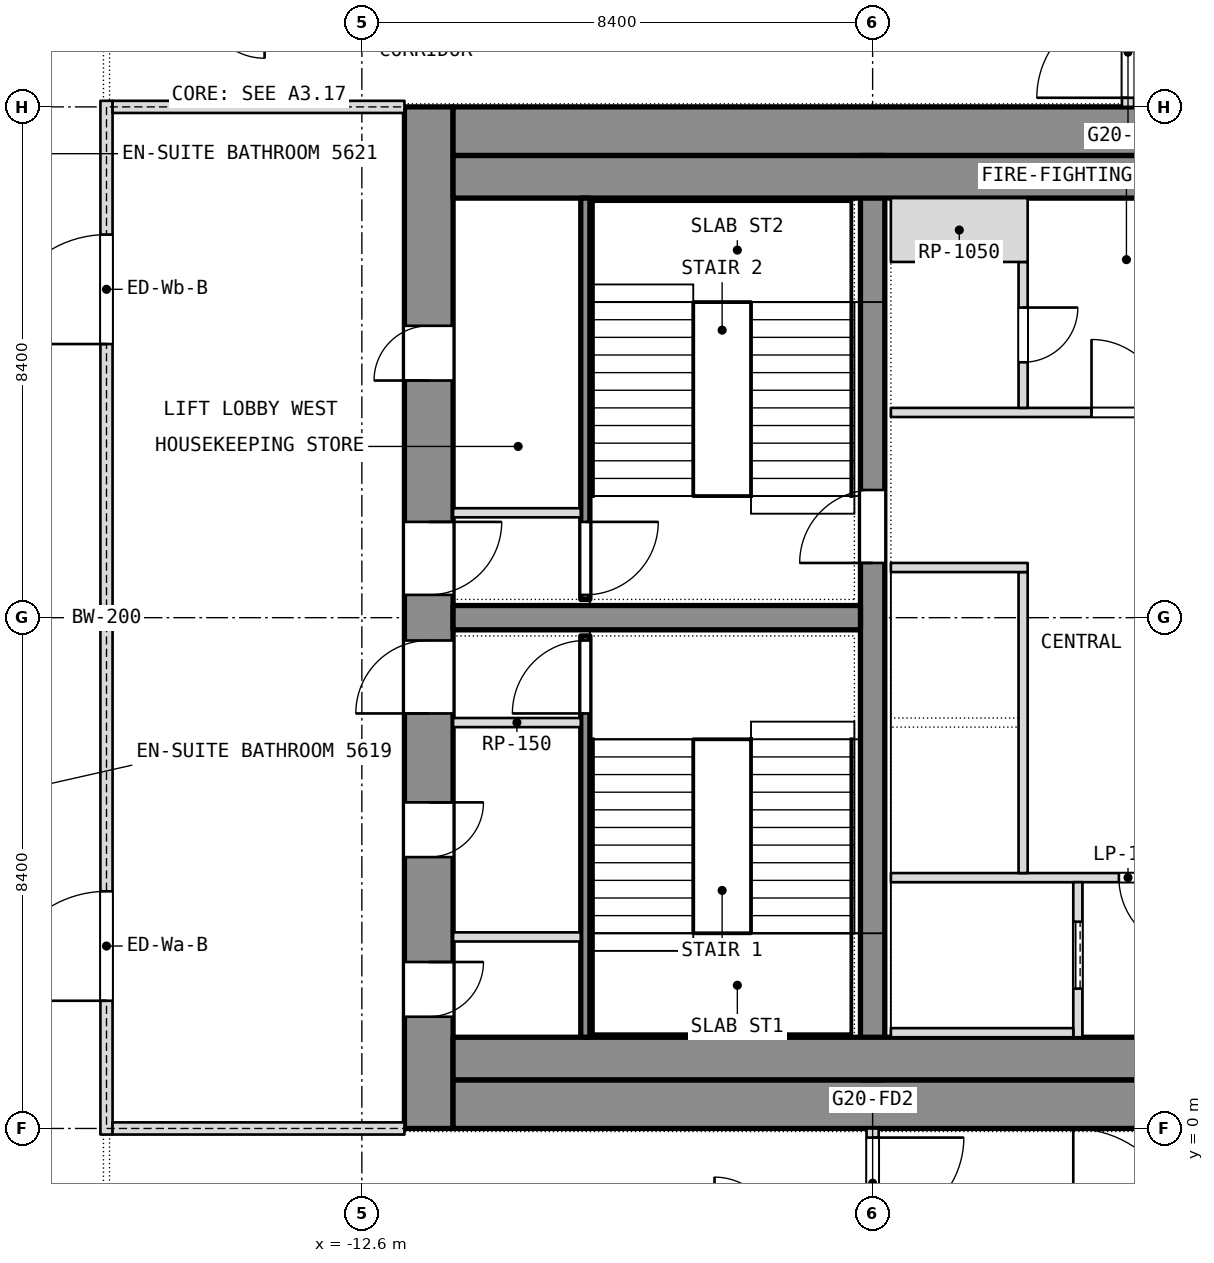
"""IFC4 building model, lengths in metres.
Left out: names, types, materials, properties, quantities, classifications, styles, units other than length and angle.
Written with IfcOpenShell. Run it as: python <this file> out.ifc"""

import sys

from ifc_helpers import new_model, si_unit, direction, frame, frame_2d, origin, place, context, subcontext, project, spatial, rectangle, extrude, element, fill, save


model = new_model("IFC4")
c1 = context("Model", 3, precision=1e-05, world=origin(), true_north=direction((0.0, 1.0)))
c2 = subcontext(c1, "Body", "Model", "MODEL_VIEW")
j1 = project(units=[si_unit("LENGTHUNIT", "METRE"), si_unit("PLANEANGLEUNIT", "RADIAN")], contexts=[c1])
p1 = place(None, origin())
s1 = spatial("IfcSite", under=j1, at=p1, CompositionType="ELEMENT")
p2 = place(p1, origin())
s2 = spatial("IfcBuilding", under=s1, at=p2, CompositionType="ELEMENT")
p3 = place(p2, frame((0.0, 0.0, 238.1)))
s3 = spatial("IfcBuildingStorey", under=s2, at=p3, CompositionType="ELEMENT", Elevation=238.1)
p4 = place(p3, frame((-11.5, 0.0, 0.0), z_axis=(0.0, 0.0, 1.0), x_axis=(0.0, 1.0, 0.0)))
e1 = element("IfcWall", 1, at=p4, inside=s3, PredefinedType="SHEAR", context=c2, shape_type="SweptSolid", body=[
    extrude(rectangle(XDim=16.8, YDim=0.8, at=frame_2d((8.4, 0.0))), origin(), (0.0, 0.0, 1.0), 3.6),
])
p5 = place(p4, frame((1.837, 0.0, 0.0)))
e2 = element("IfcOpeningElement", 2, at=p5, cuts=e1, PredefinedType="OPENING", context=c2, shape_type="SweptSolid", body=[
    extrude(rectangle(XDim=0.9, YDim=2.1, at=frame_2d((0.45, 1.05))), frame((0.0, 0.4, 0.0), z_axis=(0.0, -1.0, 0.0), x_axis=(1.0, 0.0, 0.0)), (0.0, 0.0, 1.0), 0.8),
])
p6 = place(p4, frame((4.462, 0.0, 0.0)))
e3 = element("IfcOpeningElement", 3, at=p6, cuts=e1, PredefinedType="OPENING", context=c2, shape_type="SweptSolid", body=[
    extrude(rectangle(XDim=0.9, YDim=2.1, at=frame_2d((0.45, 1.05))), frame((0.0, 0.4, 0.0), z_axis=(0.0, -1.0, 0.0), x_axis=(1.0, 0.0, 0.0)), (0.0, 0.0, 1.0), 0.8),
])
p7 = place(p4, frame((6.825, 0.0, 0.0)))
e4 = element("IfcOpeningElement", 4, at=p7, cuts=e1, PredefinedType="OPENING", context=c2, shape_type="SweptSolid", body=[
    extrude(rectangle(XDim=1.2, YDim=2.1, at=frame_2d((0.6, 1.05))), frame((0.0, 0.4, 0.0), z_axis=(0.0, -1.0, 0.0), x_axis=(1.0, 0.0, 0.0)), (0.0, 0.0, 1.0), 0.8),
])
p8 = place(p4, frame((12.3, 0.0, 0.0)))
e5 = element("IfcOpeningElement", 5, at=p8, cuts=e1, PredefinedType="OPENING", context=c2, shape_type="SweptSolid", body=[
    extrude(rectangle(XDim=0.9, YDim=2.1, at=frame_2d((0.45, 1.05))), frame((0.0, 0.4, 0.0), z_axis=(0.0, -1.0, 0.0), x_axis=(1.0, 0.0, 0.0)), (0.0, 0.0, 1.0), 0.8),
])
p9 = place(p4, frame((8.775, 0.0, 0.0)))
e6 = element("IfcOpeningElement", 6, at=p9, cuts=e1, PredefinedType="OPENING", context=c2, shape_type="SweptSolid", body=[
    extrude(rectangle(XDim=1.2, YDim=2.1, at=frame_2d((0.6, 1.05))), frame((0.0, 0.4, 0.0), z_axis=(0.0, -1.0, 0.0), x_axis=(1.0, 0.0, 0.0)), (0.0, 0.0, 1.0), 0.8),
])
for number, where, z_axis, x_axis in (
    (7, (-11.1, 0.4, 0.0), (0.0, 0.0, 1.0), (1.0, 0.0, 0.0)),
    (8, (-11.1, 16.4, 0.0), (0.0, 0.0, 1.0), (1.0, 0.0, 0.0)),
):
    element("IfcWall", number, at=place(p3, frame(where, z_axis=z_axis, x_axis=x_axis)), inside=s3, PredefinedType="SHEAR", context=c2, shape_type="SweptSolid", body=[
        extrude(rectangle(XDim=22.2, YDim=0.8, at=frame_2d((11.1, 0.0))), origin(), (0.0, 0.0, 1.0), 3.6),
    ])
p10 = place(p3, frame((-4.2, 0.8, 0.0), z_axis=(0.0, 0.0, 1.0), x_axis=(0.0, 1.0, 0.0)))
e9 = element("IfcWall", 9, at=p10, inside=s3, PredefinedType="SHEAR", context=c2, shape_type="SweptSolid", body=[
    extrude(rectangle(XDim=15.2, YDim=0.4, at=frame_2d((7.6, 0.0))), origin(), (0.0, 0.0, 1.0), 3.6),
])
p11 = place(p10, frame((8.5, 0.0, 0.0)))
e10 = element("IfcOpeningElement", 10, at=p11, cuts=e9, PredefinedType="OPENING", context=c2, shape_type="SweptSolid", body=[
    extrude(rectangle(XDim=1.2, YDim=2.1, at=frame_2d((0.6, 1.05))), frame((0.0, 0.2, 0.0), z_axis=(0.0, -1.0, 0.0), x_axis=(1.0, 0.0, 0.0)), (0.0, 0.0, 1.0), 0.4),
])
p12 = place(p3, frame((-11.1, 8.4, 0.0), z_axis=(0.0, 0.0, 1.0), x_axis=(1.0, 0.0, 0.0)))
e11 = element("IfcWall", 11, at=p12, inside=s3, PredefinedType="SHEAR", context=c2, shape_type="SweptSolid", body=[
    extrude(rectangle(XDim=6.7, YDim=0.4, at=frame_2d((3.35, 0.0))), origin(), (0.0, 0.0, 1.0), 3.6),
])
p13 = place(p3, frame((0.0, 16.8, 0.0), z_axis=(0.0, 0.0, 1.0), x_axis=(0.0, 1.0, 0.0)))
e12 = element("IfcWall", 12, at=p13, inside=s3, PredefinedType="PARTITIONING", context=c2, shape_type="SweptSolid", body=[
    extrude(rectangle(XDim=5.54, YDim=0.2, at=frame_2d((2.77, 0.0))), origin(), (0.0, 0.0, 1.0), 3.34),
])
p14 = place(p13, frame((0.15, 0.0, 0.0)))
e13 = element("IfcOpeningElement", 13, at=p14, cuts=e12, PredefinedType="OPENING", context=c2, shape_type="SweptSolid", body=[
    extrude(rectangle(XDim=1.5, YDim=2.1, at=frame_2d((0.75, 1.05))), frame((0.0, 0.1, 0.0), z_axis=(0.0, -1.0, 0.0), x_axis=(1.0, 0.0, 0.0)), (0.0, 0.0, 1.0), 0.2),
])
p15 = place(p3, frame((-4.2, -13.6, 0.0), z_axis=(0.0, 0.0, 1.0), x_axis=(0.0, 1.0, 0.0)))
e14 = element("IfcWall", 14, at=p15, inside=s3, PredefinedType="PARTITIONING", context=c2, shape_type="SweptSolid", body=[
    extrude(rectangle(XDim=13.6, YDim=0.2, at=frame_2d((6.8, 0.0))), origin(), (0.0, 0.0, 1.0), 3.34),
])
p16 = place(p15, frame((11.95, 0.0, 0.0)))
e15 = element("IfcOpeningElement", 15, at=p16, cuts=e14, PredefinedType="OPENING", context=c2, shape_type="SweptSolid", body=[
    extrude(rectangle(XDim=1.5, YDim=2.1, at=frame_2d((0.75, 1.05))), frame((0.0, 0.1, 0.0), z_axis=(0.0, -1.0, 0.0), x_axis=(1.0, 0.0, 0.0)), (0.0, 0.0, 1.0), 0.2),
])
p17 = place(p15, frame((0.25, 0.0, 0.0)))
e16 = element("IfcOpeningElement", 16, at=p17, cuts=e14, PredefinedType="OPENING", context=c2, shape_type="SweptSolid", body=[
    extrude(rectangle(XDim=1.5, YDim=2.1, at=frame_2d((0.75, 1.05))), frame((0.0, 0.1, 0.0), z_axis=(0.0, -1.0, 0.0), x_axis=(1.0, 0.0, 0.0)), (0.0, 0.0, 1.0), 0.2),
])
for number, where, z_axis, x_axis in (
    (17, (-11.1, 1.15, 0.0), (0.0, 0.0, 1.0), (1.0, 0.0, 0.0)),
    (18, (-11.1, 15.65, 0.0), (0.0, 0.0, 1.0), (1.0, 0.0, 0.0)),
):
    element("IfcWall", number, at=place(p3, frame(where, z_axis=z_axis, x_axis=x_axis)), inside=s3, PredefinedType="PARTITIONING", context=c2, shape_type="SweptSolid", body=[
        extrude(rectangle(XDim=22.2, YDim=0.7, at=frame_2d((11.1, 0.0))), origin(), (0.0, 0.0, 1.0), 3.34),
    ])
p18 = place(p3, frame((-8.925, 1.5, 0.0), z_axis=(0.0, 0.0, 1.0), x_axis=(0.0, 1.0, 0.0)))
e19 = element("IfcWall", 19, at=p18, inside=s3, PredefinedType="SHEAR", context=c2, shape_type="SweptSolid", body=[
    extrude(rectangle(XDim=6.6, YDim=0.15, at=frame_2d((3.3, 0.0))), origin(), (0.0, 0.0, 1.0), 3.34),
])
p19 = place(p18, frame((5.325, 0.0, 0.0)))
e20 = element("IfcOpeningElement", 20, at=p19, cuts=e19, PredefinedType="OPENING", context=c2, shape_type="SweptSolid", body=[
    extrude(rectangle(XDim=1.2, YDim=2.1, at=frame_2d((0.6, 1.05))), frame((0.0, 0.075, 0.0), z_axis=(0.0, -1.0, 0.0), x_axis=(1.0, 0.0, 0.0)), (0.0, 0.0, 1.0), 0.15),
])
for number, where, z_axis, x_axis in (
    (21, (-11.1, 6.675, 0.0), (0.0, 0.0, 1.0), (1.0, 0.0, 0.0)),
    (22, (-11.1, 3.15, 0.0), (0.0, 0.0, 1.0), (1.0, 0.0, 0.0)),
):
    element("IfcWall", number, at=place(p3, frame(where, z_axis=z_axis, x_axis=x_axis)), inside=s3, PredefinedType="PARTITIONING", context=c2, shape_type="SweptSolid", body=[
        extrude(rectangle(XDim=2.1, YDim=0.15, at=frame_2d((1.05, 0.0))), origin(), (0.0, 0.0, 1.0), 3.34),
    ])
p20 = place(p3, frame((-8.925, 8.7, 0.0), z_axis=(0.0, 0.0, 1.0), x_axis=(0.0, 1.0, 0.0)))
e23 = element("IfcWall", 23, at=p20, inside=s3, PredefinedType="SHEAR", context=c2, shape_type="SweptSolid", body=[
    extrude(rectangle(XDim=6.6, YDim=0.15, at=frame_2d((3.3, 0.0))), origin(), (0.0, 0.0, 1.0), 3.34),
])
p21 = place(p20, frame((0.075, 0.0, 0.0)))
e24 = element("IfcOpeningElement", 24, at=p21, cuts=e23, PredefinedType="OPENING", context=c2, shape_type="SweptSolid", body=[
    extrude(rectangle(XDim=1.2, YDim=2.1, at=frame_2d((0.6, 1.05))), frame((0.0, 0.075, 0.0), z_axis=(0.0, -1.0, 0.0), x_axis=(1.0, 0.0, 0.0)), (0.0, 0.0, 1.0), 0.15),
])
p22 = place(p3, frame((-11.1, 10.125, 0.0), z_axis=(0.0, 0.0, 1.0), x_axis=(1.0, 0.0, 0.0)))
e25 = element("IfcWall", 25, at=p22, inside=s3, PredefinedType="PARTITIONING", context=c2, shape_type="SweptSolid", body=[
    extrude(rectangle(XDim=2.1, YDim=0.15, at=frame_2d((1.05, 0.0))), origin(), (0.0, 0.0, 1.0), 3.34),
])
p23 = place(p3, frame((-3.9, 4.125, 0.0), z_axis=(0.0, 0.0, 1.0), x_axis=(1.0, 0.0, 0.0)))
e26 = element("IfcWall", 26, at=p23, inside=s3, PredefinedType="PARTITIONING", context=c2, shape_type="SweptSolid", body=[
    extrude(rectangle(XDim=7.8, YDim=0.15, at=frame_2d((3.9, 0.0))), origin(), (0.0, 0.0, 1.0), 3.34),
])
p24 = place(p23, frame((3.75, 0.0, 0.0)))
e27 = element("IfcOpeningElement", 27, at=p24, cuts=e26, PredefinedType="OPENING", context=c2, shape_type="SweptSolid", body=[
    extrude(rectangle(XDim=1.2, YDim=2.1, at=frame_2d((0.6, 1.05))), frame((0.0, 0.075, 0.0), z_axis=(0.0, -1.0, 0.0), x_axis=(1.0, 0.0, 0.0)), (0.0, 0.0, 1.0), 0.15),
])
p25 = place(p3, frame((-3.9, 11.775, 0.0), z_axis=(0.0, 0.0, 1.0), x_axis=(1.0, 0.0, 0.0)))
e28 = element("IfcWall", 28, at=p25, inside=s3, PredefinedType="PARTITIONING", context=c2, shape_type="SweptSolid", body=[
    extrude(rectangle(XDim=7.8, YDim=0.15, at=frame_2d((3.9, 0.0))), origin(), (0.0, 0.0, 1.0), 3.34),
])
p26 = place(p25, frame((3.3, 0.0, 0.0)))
e29 = element("IfcOpeningElement", 29, at=p26, cuts=e28, PredefinedType="OPENING", context=c2, shape_type="SweptSolid", body=[
    extrude(rectangle(XDim=1.2, YDim=2.1, at=frame_2d((0.6, 1.05))), frame((0.0, 0.075, 0.0), z_axis=(0.0, -1.0, 0.0), x_axis=(1.0, 0.0, 0.0)), (0.0, 0.0, 1.0), 0.15),
])
p27 = place(p3, frame((-0.825, 1.5, 0.0), z_axis=(0.0, 0.0, 1.0), x_axis=(0.0, 1.0, 0.0)))
e30 = element("IfcWall", 30, at=p27, inside=s3, PredefinedType="SHEAR", context=c2, shape_type="SweptSolid", body=[
    extrude(rectangle(XDim=2.55, YDim=0.15, at=frame_2d((1.275, 0.0))), origin(), (0.0, 0.0, 1.0), 3.6),
])
p28 = place(p27, frame((0.8, 0.0, 0.0)))
e31 = element("IfcOpeningElement", 31, at=p28, cuts=e30, PredefinedType="OPENING", context=c2, shape_type="SweptSolid", body=[
    extrude(rectangle(XDim=1.1, YDim=2.1, at=frame_2d((0.55, 1.05))), frame((0.0, 0.075, 0.0), z_axis=(0.0, -1.0, 0.0), x_axis=(1.0, 0.0, 0.0)), (0.0, 0.0, 1.0), 0.15),
])
p29 = place(p3, frame((-3.9, 1.575, 0.0), z_axis=(0.0, 0.0, 1.0), x_axis=(1.0, 0.0, 0.0)))
e32 = element("IfcWall", 32, at=p29, inside=s3, PredefinedType="SHEAR", context=c2, shape_type="SweptSolid", body=[
    extrude(rectangle(XDim=3.0, YDim=0.15, at=frame_2d((1.5, 0.0))), origin(), (0.0, 0.0, 1.0), 3.6),
])
p30 = place(p3, frame((-1.725, 4.2, 0.0), z_axis=(0.0, 0.0, 1.0), x_axis=(0.0, 1.0, 0.0)))
e33 = element("IfcWall", 33, at=p30, inside=s3, PredefinedType="SHEAR", context=c2, shape_type="SweptSolid", body=[
    extrude(rectangle(XDim=4.95, YDim=0.15, at=frame_2d((2.475, 0.0))), origin(), (0.0, 0.0, 1.0), 3.6),
])
p31 = place(p3, frame((-3.9, 9.225, 0.0), z_axis=(0.0, 0.0, 1.0), x_axis=(1.0, 0.0, 0.0)))
e34 = element("IfcWall", 34, at=p31, inside=s3, PredefinedType="SHEAR", context=c2, shape_type="SweptSolid", body=[
    extrude(rectangle(XDim=2.25, YDim=0.15, at=frame_2d((1.125, 0.0))), origin(), (0.0, 0.0, 1.0), 3.6),
])
p32 = place(p3, frame((-1.725, 11.85, 0.0), z_axis=(0.0, 0.0, 1.0), x_axis=(0.0, 1.0, 0.0)))
e35 = element("IfcWall", 35, at=p32, inside=s3, PredefinedType="PARTITIONING", context=c2, shape_type="SweptSolid", body=[
    extrude(rectangle(XDim=2.4, YDim=0.15, at=frame_2d((1.2, 0.0))), origin(), (0.0, 0.0, 1.0), 3.34),
])
p33 = place(p32, frame((0.75, 0.0, 0.0)))
e36 = element("IfcOpeningElement", 36, at=p33, cuts=e35, PredefinedType="OPENING", context=c2, shape_type="SweptSolid", body=[
    extrude(rectangle(XDim=0.9, YDim=2.1, at=frame_2d((0.45, 1.05))), frame((0.0, 0.075, 0.0), z_axis=(0.0, -1.0, 0.0), x_axis=(1.0, 0.0, 0.0)), (0.0, 0.0, 1.0), 0.15),
])
p34 = place(p3, frame((-3.9, 14.775, 0.0), z_axis=(0.0, 0.0, 1.0), x_axis=(1.0, 0.0, 0.0)))
e37 = element("IfcWall", 37, at=p34, inside=s3, PredefinedType="PARTITIONING", context=c2, shape_type="SweptSolid", body=[
    extrude(rectangle(XDim=2.25, YDim=1.05, at=frame_2d((1.125, 0.0))), origin(), (0.0, 0.0, 1.0), 3.34),
])
p35 = place(p3, frame((-16.8, -0.1, 0.0), z_axis=(0.0, 0.0, 1.0), x_axis=(0.0, 1.0, 0.0)))
e38 = element("IfcWall", 38, at=p35, inside=s3, PredefinedType="PARTITIONING", context=c2, shape_type="SweptSolid", body=[
    extrude(rectangle(XDim=17.0, YDim=0.2, at=frame_2d((8.5, 0.0))), origin(), (0.0, 0.0, 1.0), 3.34),
])
p36 = place(p35, frame((2.2, 0.0, 0.0)))
e39 = element("IfcOpeningElement", 39, at=p36, cuts=e38, PredefinedType="OPENING", context=c2, shape_type="SweptSolid", body=[
    extrude(rectangle(XDim=1.8, YDim=2.1, at=frame_2d((0.9, 1.05))), frame((0.0, 0.1, 0.0), z_axis=(0.0, -1.0, 0.0), x_axis=(1.0, 0.0, 0.0)), (0.0, 0.0, 1.0), 0.2),
])
p37 = place(p35, frame((13.0, 0.0, 0.0)))
e40 = element("IfcOpeningElement", 40, at=p37, cuts=e38, PredefinedType="OPENING", context=c2, shape_type="SweptSolid", body=[
    extrude(rectangle(XDim=1.8, YDim=2.1, at=frame_2d((0.9, 1.05))), frame((0.0, 0.1, 0.0), z_axis=(0.0, -1.0, 0.0), x_axis=(1.0, 0.0, 0.0)), (0.0, 0.0, 1.0), 0.2),
])
for number, where, z_axis, x_axis in (
    (41, (-16.7, 0.0, 0.0), (0.0, 0.0, 1.0), (1.0, 0.0, 0.0)),
    (42, (-16.7, 16.8, 0.0), (0.0, 0.0, 1.0), (1.0, 0.0, 0.0)),
):
    element("IfcWall", number, at=place(p3, frame(where, z_axis=z_axis, x_axis=x_axis)), inside=s3, PredefinedType="PARTITIONING", context=c2, shape_type="SweptSolid", body=[
        extrude(rectangle(XDim=4.8, YDim=0.2, at=frame_2d((2.4, 0.0))), origin(), (0.0, 0.0, 1.0), 2.94),
    ])
p38 = place(p5, origin())
e43 = element("IfcDoor", 43, at=p38, inside=s3, OperationType="SINGLE_SWING_LEFT", PredefinedType="DOOR", context=c2, shape_type="SweptSolid", body=[
    extrude(rectangle(XDim=0.9, YDim=2.1, at=frame_2d((0.45, 1.05))), frame((0.0, 0.025, 0.0), z_axis=(0.0, -1.0, 0.0), x_axis=(1.0, 0.0, 0.0)), (0.0, 0.0, 1.0), 0.05),
])
fill(e2, e43)
p39 = place(p6, origin())
e44 = element("IfcDoor", 44, at=p39, inside=s3, OperationType="SINGLE_SWING_LEFT", PredefinedType="DOOR", context=c2, shape_type="SweptSolid", body=[
    extrude(rectangle(XDim=0.9, YDim=2.1, at=frame_2d((0.45, 1.05))), frame((0.0, 0.025, 0.0), z_axis=(0.0, -1.0, 0.0), x_axis=(1.0, 0.0, 0.0)), (0.0, 0.0, 1.0), 0.05),
])
fill(e3, e44)
p40 = place(p7, origin())
e45 = element("IfcDoor", 45, at=p40, inside=s3, OperationType="SINGLE_SWING_LEFT", PredefinedType="DOOR", context=c2, shape_type="SweptSolid", body=[
    extrude(rectangle(XDim=1.2, YDim=2.1, at=frame_2d((0.6, 1.05))), frame((0.0, 0.025, 0.0), z_axis=(0.0, -1.0, 0.0), x_axis=(1.0, 0.0, 0.0)), (0.0, 0.0, 1.0), 0.05),
])
fill(e4, e45)
p41 = place(p19, origin())
e46 = element("IfcDoor", 46, at=p41, inside=s3, OperationType="SINGLE_SWING_LEFT", PredefinedType="DOOR", context=c2, shape_type="SweptSolid", body=[
    extrude(rectangle(XDim=1.2, YDim=2.1, at=frame_2d((0.6, 1.05))), frame((0.0, 0.025, 0.0), z_axis=(0.0, -1.0, 0.0), x_axis=(1.0, 0.0, 0.0)), (0.0, 0.0, 1.0), 0.05),
])
fill(e20, e46)
p42 = place(p8, origin())
e47 = element("IfcDoor", 47, at=p42, inside=s3, OperationType="SINGLE_SWING_LEFT", PredefinedType="DOOR", context=c2, shape_type="SweptSolid", body=[
    extrude(rectangle(XDim=0.9, YDim=2.1, at=frame_2d((0.45, 1.05))), frame((0.0, 0.025, 0.0), z_axis=(0.0, -1.0, 0.0), x_axis=(1.0, 0.0, 0.0)), (0.0, 0.0, 1.0), 0.05),
])
fill(e5, e47)
p43 = place(p9, origin())
e48 = element("IfcDoor", 48, at=p43, inside=s3, OperationType="SINGLE_SWING_LEFT", PredefinedType="DOOR", context=c2, shape_type="SweptSolid", body=[
    extrude(rectangle(XDim=1.2, YDim=2.1, at=frame_2d((0.6, 1.05))), frame((0.0, 0.025, 0.0), z_axis=(0.0, -1.0, 0.0), x_axis=(1.0, 0.0, 0.0)), (0.0, 0.0, 1.0), 0.05),
])
fill(e6, e48)
p44 = place(p21, origin())
e49 = element("IfcDoor", 49, at=p44, inside=s3, OperationType="SINGLE_SWING_LEFT", PredefinedType="DOOR", context=c2, shape_type="SweptSolid", body=[
    extrude(rectangle(XDim=1.2, YDim=2.1, at=frame_2d((0.6, 1.05))), frame((0.0, 0.025, 0.0), z_axis=(0.0, -1.0, 0.0), x_axis=(1.0, 0.0, 0.0)), (0.0, 0.0, 1.0), 0.05),
])
fill(e24, e49)
p45 = place(p28, origin())
e50 = element("IfcDoor", 50, at=p45, inside=s3, OperationType="SLIDING_TO_LEFT", PredefinedType="DOOR", context=c2, shape_type="SweptSolid", body=[
    extrude(rectangle(XDim=1.1, YDim=2.1, at=frame_2d((0.55, 1.05))), frame((0.0, 0.025, 0.0), z_axis=(0.0, -1.0, 0.0), x_axis=(1.0, 0.0, 0.0)), (0.0, 0.0, 1.0), 0.05),
])
fill(e31, e50)
p46 = place(p24, origin())
e51 = element("IfcDoor", 51, at=p46, inside=s3, OperationType="SINGLE_SWING_LEFT", PredefinedType="DOOR", context=c2, shape_type="SweptSolid", body=[
    extrude(rectangle(XDim=1.2, YDim=2.1, at=frame_2d((0.6, 1.05))), frame((0.0, 0.025, 0.0), z_axis=(0.0, -1.0, 0.0), x_axis=(1.0, 0.0, 0.0)), (0.0, 0.0, 1.0), 0.05),
])
fill(e27, e51)
p47 = place(p26, origin())
e52 = element("IfcDoor", 52, at=p47, inside=s3, OperationType="SINGLE_SWING_LEFT", PredefinedType="DOOR", context=c2, shape_type="SweptSolid", body=[
    extrude(rectangle(XDim=1.2, YDim=2.1, at=frame_2d((0.6, 1.05))), frame((0.0, 0.025, 0.0), z_axis=(0.0, -1.0, 0.0), x_axis=(1.0, 0.0, 0.0)), (0.0, 0.0, 1.0), 0.05),
])
fill(e29, e52)
p48 = place(p33, origin())
e53 = element("IfcDoor", 53, at=p48, inside=s3, OperationType="SINGLE_SWING_LEFT", PredefinedType="DOOR", context=c2, shape_type="SweptSolid", body=[
    extrude(rectangle(XDim=0.9, YDim=2.1, at=frame_2d((0.45, 1.05))), frame((0.0, 0.025, 0.0), z_axis=(0.0, -1.0, 0.0), x_axis=(1.0, 0.0, 0.0)), (0.0, 0.0, 1.0), 0.05),
])
fill(e36, e53)
p49 = place(p11, origin())
e54 = element("IfcDoor", 54, at=p49, inside=s3, OperationType="SINGLE_SWING_LEFT", PredefinedType="DOOR", context=c2, shape_type="SweptSolid", body=[
    extrude(rectangle(XDim=1.2, YDim=2.1, at=frame_2d((0.6, 1.05))), frame((0.0, 0.025, 0.0), z_axis=(0.0, -1.0, 0.0), x_axis=(1.0, 0.0, 0.0)), (0.0, 0.0, 1.0), 0.05),
])
fill(e10, e54)
p50 = place(p36, origin())
e55 = element("IfcDoor", 55, at=p50, inside=s3, OperationType="DOUBLE_DOOR_SINGLE_SWING", PredefinedType="DOOR", context=c2, shape_type="SweptSolid", body=[
    extrude(rectangle(XDim=1.8, YDim=2.1, at=frame_2d((0.9, 1.05))), frame((0.0, 0.025, 0.0), z_axis=(0.0, -1.0, 0.0), x_axis=(1.0, 0.0, 0.0)), (0.0, 0.0, 1.0), 0.05),
])
fill(e39, e55)
p51 = place(p37, origin())
e56 = element("IfcDoor", 56, at=p51, inside=s3, OperationType="DOUBLE_DOOR_SINGLE_SWING", PredefinedType="DOOR", context=c2, shape_type="SweptSolid", body=[
    extrude(rectangle(XDim=1.8, YDim=2.1, at=frame_2d((0.9, 1.05))), frame((0.0, 0.025, 0.0), z_axis=(0.0, -1.0, 0.0), x_axis=(1.0, 0.0, 0.0)), (0.0, 0.0, 1.0), 0.05),
])
fill(e40, e56)
p52 = place(p14, origin())
e57 = element("IfcDoor", 57, at=p52, inside=s3, OperationType="DOUBLE_DOOR_DOUBLE_SWING", PredefinedType="DOOR", context=c2, shape_type="SweptSolid", body=[
    extrude(rectangle(XDim=1.5, YDim=2.1, at=frame_2d((0.75, 1.05))), frame((0.0, 0.025, 0.0), z_axis=(0.0, -1.0, 0.0), x_axis=(1.0, 0.0, 0.0)), (0.0, 0.0, 1.0), 0.05),
])
fill(e13, e57)
p53 = place(p16, origin())
e58 = element("IfcDoor", 58, at=p53, inside=s3, OperationType="DOUBLE_DOOR_DOUBLE_SWING", PredefinedType="DOOR", context=c2, shape_type="SweptSolid", body=[
    extrude(rectangle(XDim=1.5, YDim=2.1, at=frame_2d((0.75, 1.05))), frame((0.0, 0.025, 0.0), z_axis=(0.0, -1.0, 0.0), x_axis=(1.0, 0.0, 0.0)), (0.0, 0.0, 1.0), 0.05),
])
fill(e15, e58)
save(model, sys.argv[1])
